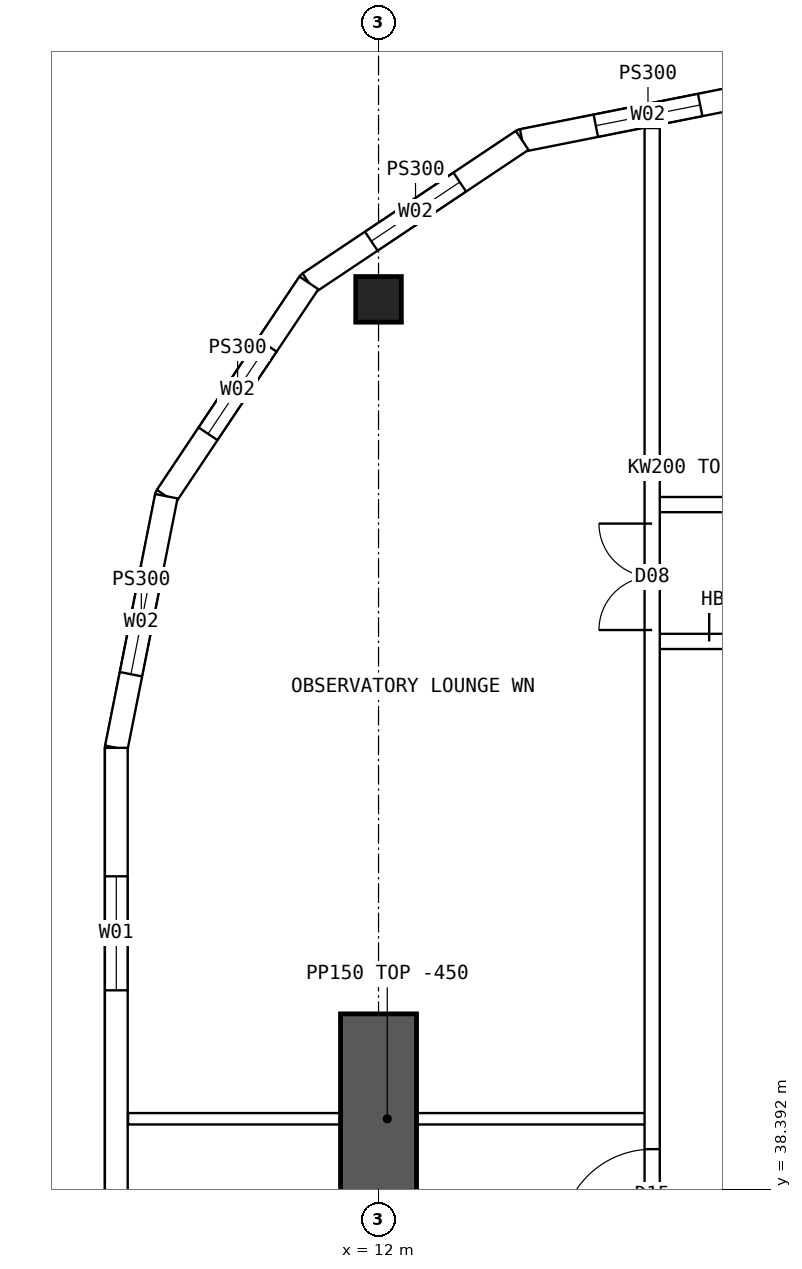
"""IFC4 building model, lengths in metres.
Left out: names, types, materials, properties, quantities, classifications, styles, units other than length and angle.
Written with IfcOpenShell. Run it as: python <this file> out.ifc"""

import sys

from ifc_helpers import new_model, si_unit, direction, frame, frame_2d, origin, origin_2d, place, context, subcontext, project, spatial, polyline, rectangle, hollow_rectangle, outline, extrude, element, fill, save


model = new_model("IFC4")
c1 = context("Model", 3, precision=1e-05, world=origin(), true_north=direction((0.0, 1.0)))
c2 = subcontext(c1, "Body", "Model", "MODEL_VIEW")
j1 = project(units=[si_unit("LENGTHUNIT", "METRE"), si_unit("PLANEANGLEUNIT", "RADIAN")], contexts=[c1])
p1 = place(None, origin())
s1 = spatial("IfcSite", under=j1, at=p1, CompositionType="ELEMENT")
p2 = place(p1, origin())
s2 = spatial("IfcBuilding", under=s1, at=p2, CompositionType="ELEMENT")
p3 = place(p2, frame((0.0, 0.0, 227.8)))
s3 = spatial("IfcBuildingStorey", under=s2, at=p3, CompositionType="ELEMENT", Elevation=227.8)
p4 = place(p3, frame((12.0, 50.1, 0.0), z_axis=(0.0, 0.0, 1.0), x_axis=(1.0, 0.0, 0.0)))
e1 = element("IfcColumn", 1, at=p4, inside=s3, PredefinedType="COLUMN", context=c2, shape_type="SweptSolid", body=[
    extrude(hollow_rectangle(XDim=0.6, YDim=0.6, WallThickness=0.06, at=origin_2d()), origin(), (0.0, 0.0, 1.0), 3.75),
])
p5 = place(p3, frame((12.0, 35.7, 0.0), z_axis=(0.0, 0.0, 1.0), x_axis=(0.0, 1.0, 0.0)))
e2 = element("IfcWall", 2, at=p5, inside=s3, PredefinedType="SHEAR", context=c2, shape_type="SweptSolid", body=[
    extrude(rectangle(XDim=5.0, YDim=1.0, at=frame_2d((2.5, 0.0))), origin(), (0.0, 0.0, 1.0), 3.75),
])
p6 = place(p3, frame((8.55, 44.2, 0.0), z_axis=(0.0, 0.0, 1.0), x_axis=(0.0, -1.0, 0.0)))
e3 = element("IfcWall", 3, at=p6, inside=s3, PredefinedType="SOLIDWALL", context=c2, shape_type="SweptSolid", body=[
    extrude(outline(polyline([(-0.015, -0.15), (24.415, -0.15), (24.385, 0.15), (0.015, 0.15), (-0.015, -0.15)])), origin(), (0.0, 0.0, 1.0), 3.3),
])
p7 = place(p6, frame((1.69, 0.0, 0.9)))
e4 = element("IfcOpeningElement", 4, at=p7, cuts=e3, PredefinedType="OPENING", context=c2, shape_type="SweptSolid", body=[
    extrude(rectangle(XDim=1.5, YDim=2.0, at=frame_2d((0.75, 1.0))), frame((0.0, 0.16, 0.0), z_axis=(0.0, -1.0, 0.0), x_axis=(1.0, 0.0, 0.0)), (0.0, 0.0, 1.0), 0.32),
])
p8 = place(p6, frame((6.57, 0.0, 0.9)))
e5 = element("IfcOpeningElement", 5, at=p8, cuts=e3, PredefinedType="OPENING", context=c2, shape_type="SweptSolid", body=[
    extrude(rectangle(XDim=1.5, YDim=2.0, at=frame_2d((0.75, 1.0))), frame((0.0, 0.16, 0.0), z_axis=(0.0, -1.0, 0.0), x_axis=(1.0, 0.0, 0.0)), (0.0, 0.0, 1.0), 0.32),
])
p9 = place(p6, frame((11.45, 0.0, 0.9)))
e6 = element("IfcOpeningElement", 6, at=p9, cuts=e3, PredefinedType="OPENING", context=c2, shape_type="SweptSolid", body=[
    extrude(rectangle(XDim=1.5, YDim=2.0, at=frame_2d((0.75, 1.0))), frame((0.0, 0.16, 0.0), z_axis=(0.0, -1.0, 0.0), x_axis=(1.0, 0.0, 0.0)), (0.0, 0.0, 1.0), 0.32),
])
p10 = place(p6, frame((16.33, 0.0, 0.9)))
e7 = element("IfcOpeningElement", 7, at=p10, cuts=e3, PredefinedType="OPENING", context=c2, shape_type="SweptSolid", body=[
    extrude(rectangle(XDim=1.5, YDim=2.0, at=frame_2d((0.75, 1.0))), frame((0.0, 0.16, 0.0), z_axis=(0.0, -1.0, 0.0), x_axis=(1.0, 0.0, 0.0)), (0.0, 0.0, 1.0), 0.32),
])
p11 = place(p6, frame((21.21, 0.0, 0.9)))
e8 = element("IfcOpeningElement", 8, at=p11, cuts=e3, PredefinedType="OPENING", context=c2, shape_type="SweptSolid", body=[
    extrude(rectangle(XDim=1.5, YDim=2.0, at=frame_2d((0.75, 1.0))), frame((0.0, 0.16, 0.0), z_axis=(0.0, -1.0, 0.0), x_axis=(1.0, 0.0, 0.0)), (0.0, 0.0, 1.0), 0.32),
])
p12 = place(p3, frame((17.2, 52.85, 0.0), z_axis=(0.0, 0.0, 1.0), x_axis=(-0.98078325777, -0.195100490205, 0.0)))
e9 = element("IfcWall", 9, at=p12, inside=s3, PredefinedType="SOLIDWALL", context=c2, shape_type="SweptSolid", body=[
    extrude(outline(polyline([(-0.03, -0.15), (3.405, -0.15), (3.345, 0.15), (0.03, 0.15), (-0.03, -0.15)])), origin(), (0.0, 0.0, 1.0), 3.3),
])
p13 = place(p12, frame((0.988, 0.0, 0.9)))
e10 = element("IfcOpeningElement", 10, at=p13, cuts=e9, PredefinedType="OPENING", context=c2, shape_type="SweptSolid", body=[
    extrude(rectangle(XDim=1.4, YDim=1.8, at=frame_2d((0.7, 0.9))), frame((0.0, 0.16, 0.0), z_axis=(0.0, -1.0, 0.0), x_axis=(1.0, 0.0, 0.0)), (0.0, 0.0, 1.0), 0.32),
])
p14 = place(p3, frame((13.89, 52.192, 0.0), z_axis=(0.0, 0.0, 1.0), x_axis=(-0.831460037396, -0.555584562613, 0.0)))
e11 = element("IfcWall", 11, at=p14, inside=s3, PredefinedType="SOLIDWALL", context=c2, shape_type="SweptSolid", body=[
    extrude(outline(polyline([(-0.03, -0.15), (3.405, -0.15), (3.345, 0.15), (0.03, 0.15), (-0.03, -0.15)])), origin(), (0.0, 0.0, 1.0), 3.3),
])
p15 = place(p14, frame((0.988, 0.0, 0.9)))
e12 = element("IfcOpeningElement", 12, at=p15, cuts=e11, PredefinedType="OPENING", context=c2, shape_type="SweptSolid", body=[
    extrude(rectangle(XDim=1.4, YDim=1.8, at=frame_2d((0.7, 0.9))), frame((0.0, 0.16, 0.0), z_axis=(0.0, -1.0, 0.0), x_axis=(1.0, 0.0, 0.0)), (0.0, 0.0, 1.0), 0.32),
])
p16 = place(p3, frame((11.083, 50.316, 0.0), z_axis=(0.0, 0.0, 1.0), x_axis=(-0.555567969291, -0.831471124873, 0.0)))
e13 = element("IfcWall", 13, at=p16, inside=s3, PredefinedType="SOLIDWALL", context=c2, shape_type="SweptSolid", body=[
    extrude(outline(polyline([(-0.03, -0.15), (3.405, -0.15), (3.345, 0.15), (0.03, 0.15), (-0.03, -0.15)])), origin(), (0.0, 0.0, 1.0), 3.3),
])
p17 = place(p16, frame((0.988, 0.0, 0.9)))
e14 = element("IfcOpeningElement", 14, at=p17, cuts=e13, PredefinedType="OPENING", context=c2, shape_type="SweptSolid", body=[
    extrude(rectangle(XDim=1.4, YDim=1.8, at=frame_2d((0.7, 0.9))), frame((0.0, 0.16, 0.0), z_axis=(0.0, -1.0, 0.0), x_axis=(1.0, 0.0, 0.0)), (0.0, 0.0, 1.0), 0.32),
])
p18 = place(p3, frame((9.208, 47.51, 0.0), z_axis=(0.0, 0.0, 1.0), x_axis=(-0.19508664885, -0.980786011034, 0.0)))
e15 = element("IfcWall", 15, at=p18, inside=s3, PredefinedType="SOLIDWALL", context=c2, shape_type="SweptSolid", body=[
    extrude(outline(polyline([(-0.03, -0.15), (3.39, -0.15), (3.36, 0.15), (0.03, 0.15), (-0.03, -0.15)])), origin(), (0.0, 0.0, 1.0), 3.3),
])
p19 = place(p18, frame((0.988, 0.0, 0.9)))
e16 = element("IfcOpeningElement", 16, at=p19, cuts=e15, PredefinedType="OPENING", context=c2, shape_type="SweptSolid", body=[
    extrude(rectangle(XDim=1.4, YDim=1.8, at=frame_2d((0.7, 0.9))), frame((0.0, 0.16, 0.0), z_axis=(0.0, -1.0, 0.0), x_axis=(1.0, 0.0, 0.0)), (0.0, 0.0, 1.0), 0.32),
])
p20 = place(p3, frame((15.6, 47.4, 0.0), z_axis=(0.0, 0.0, 1.0), x_axis=(1.0, 0.0, 0.0)))
e17 = element("IfcWall", 17, at=p20, inside=s3, PredefinedType="SOLIDWALL", context=c2, shape_type="SweptSolid", body=[
    extrude(rectangle(XDim=2.05, YDim=0.2, at=frame_2d((1.025, 0.0))), origin(), (0.0, 0.0, 1.0), 3.3),
])
p21 = place(p20, frame((0.95, 0.0, 0.0)))
e18 = element("IfcOpeningElement", 18, at=p21, cuts=e17, PredefinedType="OPENING", context=c2, shape_type="SweptSolid", body=[
    extrude(rectangle(XDim=0.9, YDim=2.1, at=frame_2d((0.45, 1.05))), frame((0.0, 0.11, 0.0), z_axis=(0.0, -1.0, 0.0), x_axis=(1.0, 0.0, 0.0)), (0.0, 0.0, 1.0), 0.22),
])
p22 = place(p3, frame((15.6, 45.6, 0.0), z_axis=(0.0, 0.0, 1.0), x_axis=(1.0, 0.0, 0.0)))
e19 = element("IfcWall", 19, at=p22, inside=s3, PredefinedType="SOLIDWALL", context=c2, shape_type="SweptSolid", body=[
    extrude(rectangle(XDim=2.05, YDim=0.2, at=frame_2d((1.025, 0.0))), origin(), (0.0, 0.0, 1.0), 3.3),
])
p23 = place(p22, frame((0.75, 0.0, 0.0)))
e20 = element("IfcOpeningElement", 20, at=p23, cuts=e19, PredefinedType="OPENING", context=c2, shape_type="SweptSolid", body=[
    extrude(rectangle(XDim=1.2, YDim=2.1, at=frame_2d((0.6, 1.05))), frame((0.0, 0.11, 0.0), z_axis=(0.0, -1.0, 0.0), x_axis=(1.0, 0.0, 0.0)), (0.0, 0.0, 1.0), 0.22),
])
p24 = place(p3, frame((15.6, 11.646, 0.0), z_axis=(0.0, 0.0, 1.0), x_axis=(0.0, 1.0, 0.0)))
e21 = element("IfcWall", 21, at=p24, inside=s3, PredefinedType="SOLIDWALL", context=c2, shape_type="SweptSolid", body=[
    extrude(rectangle(XDim=40.708, YDim=0.2, at=frame_2d((20.354, 0.0))), origin(), (0.0, 0.0, 1.0), 3.3),
])
p25 = place(p24, frame((13.434, 0.0, 0.0)))
e22 = element("IfcOpeningElement", 22, at=p25, cuts=e21, PredefinedType="OPENING", context=c2, shape_type="SweptSolid", body=[
    extrude(rectangle(XDim=1.2, YDim=2.1, at=frame_2d((0.6, 1.05))), frame((0.0, 0.11, 0.0), z_axis=(0.0, -1.0, 0.0), x_axis=(1.0, 0.0, 0.0)), (0.0, 0.0, 1.0), 0.22),
])
p26 = place(p24, frame((26.074, 0.0, 0.0)))
e23 = element("IfcOpeningElement", 23, at=p26, cuts=e21, PredefinedType="OPENING", context=c2, shape_type="SweptSolid", body=[
    extrude(rectangle(XDim=1.2, YDim=2.1, at=frame_2d((0.6, 1.05))), frame((0.0, 0.11, 0.0), z_axis=(0.0, -1.0, 0.0), x_axis=(1.0, 0.0, 0.0)), (0.0, 0.0, 1.0), 0.22),
])
p27 = place(p24, frame((5.104, 0.0, 0.0)))
e24 = element("IfcOpeningElement", 24, at=p27, cuts=e21, PredefinedType="OPENING", context=c2, shape_type="SweptSolid", body=[
    extrude(rectangle(XDim=1.4, YDim=2.1, at=frame_2d((0.7, 1.05))), frame((0.0, 0.11, 0.0), z_axis=(0.0, -1.0, 0.0), x_axis=(1.0, 0.0, 0.0)), (0.0, 0.0, 1.0), 0.22),
])
p28 = place(p24, frame((34.104, 0.0, 0.0)))
e25 = element("IfcOpeningElement", 25, at=p28, cuts=e21, PredefinedType="OPENING", context=c2, shape_type="SweptSolid", body=[
    extrude(rectangle(XDim=1.4, YDim=2.1, at=frame_2d((0.7, 1.05))), frame((0.0, 0.11, 0.0), z_axis=(0.0, -1.0, 0.0), x_axis=(1.0, 0.0, 0.0)), (0.0, 0.0, 1.0), 0.22),
])
p29 = place(p3, frame((8.705, 39.32, 0.0), z_axis=(0.0, 0.0, 1.0), x_axis=(1.0, 0.0, 0.0)))
e26 = element("IfcWall", 26, at=p29, inside=s3, PredefinedType="PARTITIONING", context=c2, shape_type="SweptSolid", body=[
    extrude(rectangle(XDim=6.82, YDim=0.15, at=frame_2d((3.41, 0.0))), origin(), (0.0, 0.0, 1.0), 3.3),
])
p30 = place(p7, origin())
e27 = element("IfcWindow", 27, at=p30, inside=s3, PartitioningType="SINGLE_PANEL", PredefinedType="WINDOW", context=c2, shape_type="SweptSolid", body=[
    extrude(rectangle(XDim=1.5, YDim=2.0, at=frame_2d((0.75, 1.0))), frame((0.0, 0.03, 0.0), z_axis=(0.0, -1.0, 0.0), x_axis=(1.0, 0.0, 0.0)), (0.0, 0.0, 1.0), 0.06),
])
fill(e4, e27)
p31 = place(p13, origin())
e28 = element("IfcWindow", 28, at=p31, inside=s3, PartitioningType="SINGLE_PANEL", PredefinedType="WINDOW", context=c2, shape_type="SweptSolid", body=[
    extrude(rectangle(XDim=1.4, YDim=1.8, at=frame_2d((0.7, 0.9))), frame((0.0, 0.03, 0.0), z_axis=(0.0, -1.0, 0.0), x_axis=(1.0, 0.0, 0.0)), (0.0, 0.0, 1.0), 0.06),
])
fill(e10, e28)
p32 = place(p15, origin())
e29 = element("IfcWindow", 29, at=p32, inside=s3, PartitioningType="SINGLE_PANEL", PredefinedType="WINDOW", context=c2, shape_type="SweptSolid", body=[
    extrude(rectangle(XDim=1.4, YDim=1.8, at=frame_2d((0.7, 0.9))), frame((0.0, 0.03, 0.0), z_axis=(0.0, -1.0, 0.0), x_axis=(1.0, 0.0, 0.0)), (0.0, 0.0, 1.0), 0.06),
])
fill(e12, e29)
p33 = place(p17, origin())
e30 = element("IfcWindow", 30, at=p33, inside=s3, PartitioningType="SINGLE_PANEL", PredefinedType="WINDOW", context=c2, shape_type="SweptSolid", body=[
    extrude(rectangle(XDim=1.4, YDim=1.8, at=frame_2d((0.7, 0.9))), frame((0.0, 0.03, 0.0), z_axis=(0.0, -1.0, 0.0), x_axis=(1.0, 0.0, 0.0)), (0.0, 0.0, 1.0), 0.06),
])
fill(e14, e30)
p34 = place(p19, origin())
e31 = element("IfcWindow", 31, at=p34, inside=s3, PartitioningType="SINGLE_PANEL", PredefinedType="WINDOW", context=c2, shape_type="SweptSolid", body=[
    extrude(rectangle(XDim=1.4, YDim=1.8, at=frame_2d((0.7, 0.9))), frame((0.0, 0.03, 0.0), z_axis=(0.0, -1.0, 0.0), x_axis=(1.0, 0.0, 0.0)), (0.0, 0.0, 1.0), 0.06),
])
fill(e16, e31)
p35 = place(p23, origin())
e32 = element("IfcDoor", 32, at=p35, inside=s3, OperationType="DOUBLE_DOOR_SINGLE_SWING", PredefinedType="DOOR", context=c2, shape_type="SweptSolid", body=[
    extrude(rectangle(XDim=1.2, YDim=2.1, at=frame_2d((0.6, 1.05))), frame((0.0, 0.025, 0.0), z_axis=(0.0, -1.0, 0.0), x_axis=(1.0, 0.0, 0.0)), (0.0, 0.0, 1.0), 0.05),
])
fill(e20, e32)
p36 = place(p26, origin())
e33 = element("IfcDoor", 33, at=p36, inside=s3, OperationType="SINGLE_SWING_LEFT", PredefinedType="DOOR", context=c2, shape_type="SweptSolid", body=[
    extrude(rectangle(XDim=1.2, YDim=2.1, at=frame_2d((0.6, 1.05))), frame((0.0, 0.025, 0.0), z_axis=(0.0, -1.0, 0.0), x_axis=(1.0, 0.0, 0.0)), (0.0, 0.0, 1.0), 0.05),
])
fill(e23, e33)
p37 = place(p28, origin())
e34 = element("IfcDoor", 34, at=p37, inside=s3, OperationType="DOUBLE_DOOR_SINGLE_SWING", PredefinedType="DOOR", context=c2, shape_type="SweptSolid", body=[
    extrude(rectangle(XDim=1.4, YDim=2.1, at=frame_2d((0.7, 1.05))), frame((0.0, 0.025, 0.0), z_axis=(0.0, -1.0, 0.0), x_axis=(1.0, 0.0, 0.0)), (0.0, 0.0, 1.0), 0.05),
])
fill(e25, e34)
save(model, sys.argv[1])
